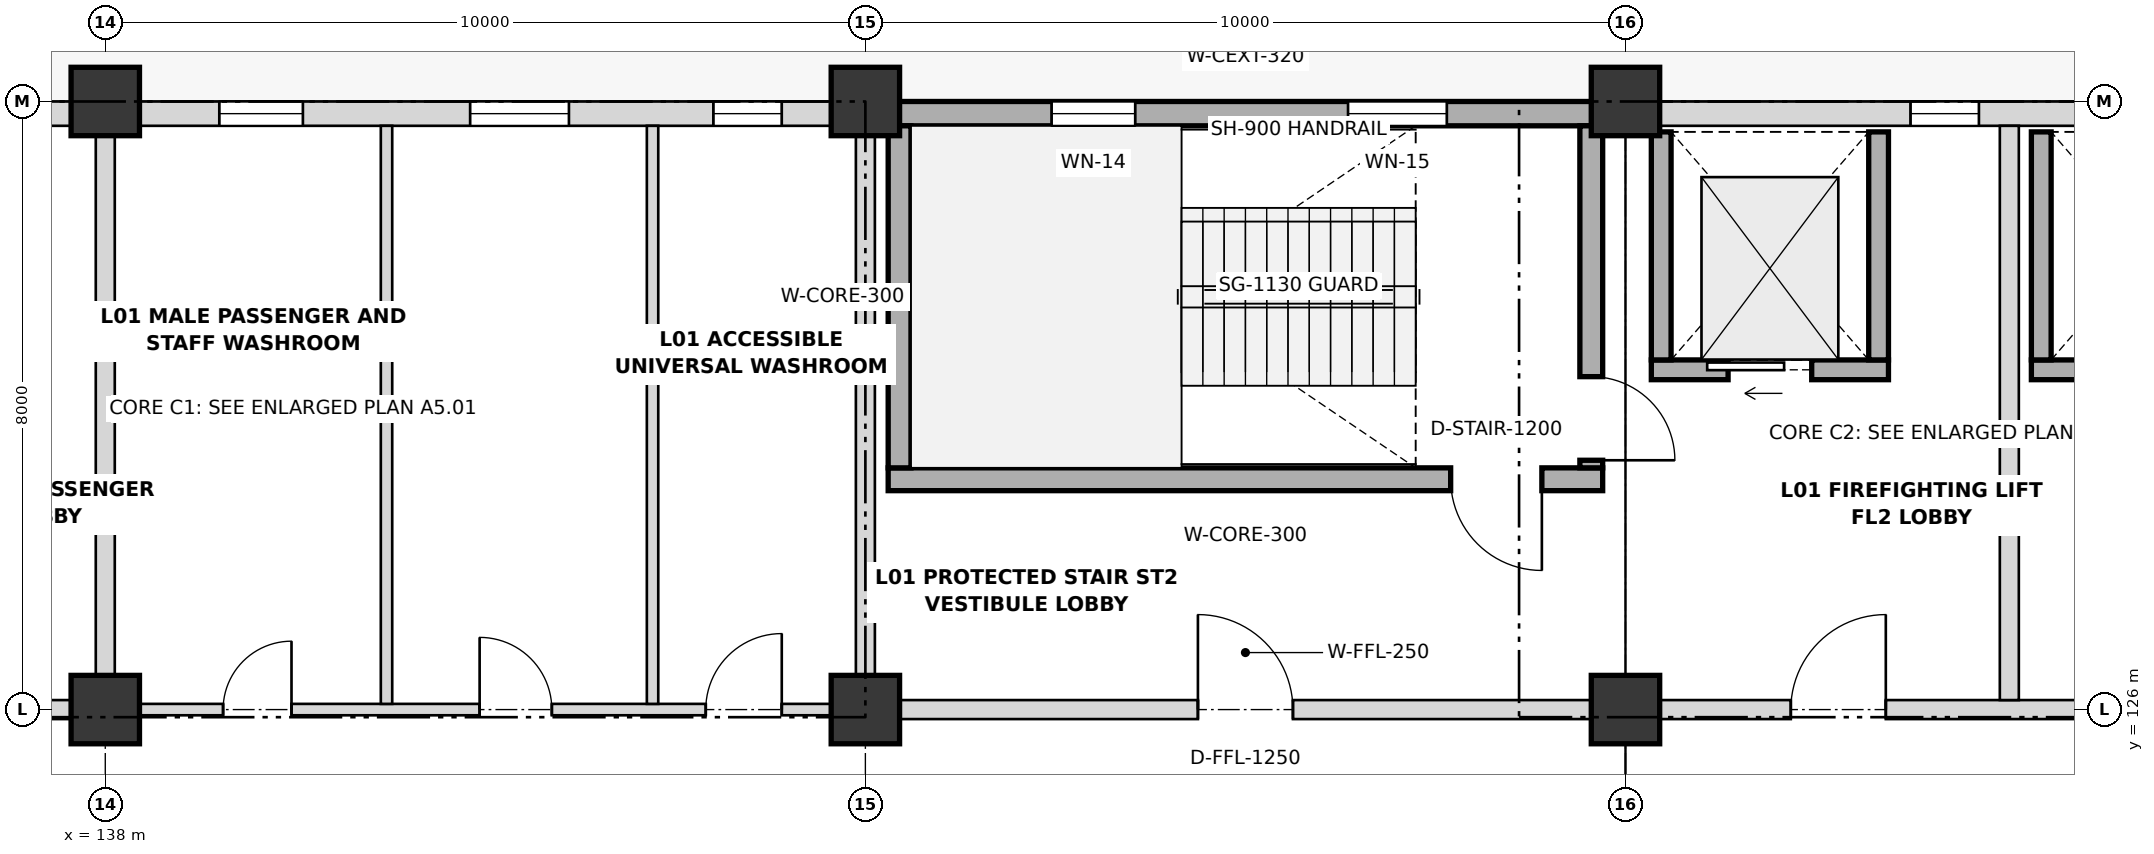
"""IFC4 building model, lengths in metres.
Left out: names, types, materials, properties, quantities, classifications, styles, units other than length and angle.
Written with IfcOpenShell. Run it as: python <this file> out.ifc"""

import sys

from ifc_helpers import new_model, si_unit, direction, frame, frame_2d, origin, origin_2d, place, context, subcontext, project, spatial, rectangle, extrude, element, fill, save


model = new_model("IFC4")
c1 = context("Model", 3, precision=1e-05, world=origin(), true_north=direction((0.0, 1.0)))
c2 = subcontext(c1, "Body", "Model", "MODEL_VIEW")
j1 = project(units=[si_unit("LENGTHUNIT", "METRE"), si_unit("PLANEANGLEUNIT", "RADIAN")], contexts=[c1])
p1 = place(None, origin())
s1 = spatial("IfcSite", under=j1, at=p1, CompositionType="ELEMENT")
p2 = place(p1, origin())
s2 = spatial("IfcBuilding", under=s1, at=p2, CompositionType="ELEMENT")
p3 = place(p2, frame((0.0, 0.0, 5.4)))
s3 = spatial("IfcBuildingStorey", under=s2, at=p3, CompositionType="ELEMENT", Elevation=5.4)
for number, where, z_axis, x_axis in (
    (1, (138.0, 126.0, 0.0), (0.0, 0.0, 1.0), (1.0, 0.0, 0.0)),
    (2, (138.0, 134.0, 0.0), (0.0, 0.0, 1.0), (1.0, 0.0, 0.0)),
    (3, (148.0, 126.0, 0.0), (0.0, 0.0, 1.0), (1.0, 0.0, 0.0)),
    (4, (148.0, 134.0, 0.0), (0.0, 0.0, 1.0), (1.0, 0.0, 0.0)),
    (5, (158.0, 126.0, 0.0), (0.0, 0.0, 1.0), (1.0, 0.0, 0.0)),
    (6, (158.0, 134.0, 0.0), (0.0, 0.0, 1.0), (1.0, 0.0, 0.0)),
):
    element("IfcColumn", number, at=place(p3, frame(where, z_axis=z_axis, x_axis=x_axis)), inside=s3, PredefinedType="COLUMN", context=c2, shape_type="SweptSolid", body=[
        extrude(rectangle(XDim=0.9, YDim=0.9, at=origin_2d()), origin(), (0.0, 0.0, 1.0), 4.2),
    ])
p4 = place(p3, frame((128.445, 133.84, 0.0), z_axis=(0.0, 0.0, 1.0), x_axis=(1.0, 0.0, 0.0)))
e7 = element("IfcWall", 7, at=p4, inside=s3, PredefinedType="SOLIDWALL", context=c2, shape_type="SweptSolid", body=[
    extrude(rectangle(XDim=9.11, YDim=0.32, at=frame_2d((4.555, 0.0))), origin(), (0.0, 0.0, 1.0), 3.118),
])
p5 = place(p4, frame((3.305, 0.0, 1.05)))
e8 = element("IfcOpeningElement", 8, at=p5, cuts=e7, PredefinedType="OPENING", context=c2, shape_type="SweptSolid", body=[
    extrude(rectangle(XDim=0.9, YDim=1.15, at=frame_2d((0.45, 0.575))), frame((0.0, 0.17, 0.0), z_axis=(0.0, -1.0, 0.0), x_axis=(1.0, 0.0, 0.0)), (0.0, 0.0, 1.0), 0.34),
])
p6 = place(p3, frame((138.445, 133.84, 0.0), z_axis=(0.0, 0.0, 1.0), x_axis=(1.0, 0.0, 0.0)))
e9 = element("IfcWall", 9, at=p6, inside=s3, PredefinedType="SOLIDWALL", context=c2, shape_type="SweptSolid", body=[
    extrude(rectangle(XDim=9.11, YDim=0.32, at=frame_2d((4.555, 0.0))), origin(), (0.0, 0.0, 1.0), 3.118),
])
p7 = place(p6, frame((1.055, 0.0, 1.25)))
e10 = element("IfcOpeningElement", 10, at=p7, cuts=e9, PredefinedType="OPENING", context=c2, shape_type="SweptSolid", body=[
    extrude(rectangle(XDim=1.1, YDim=1.15, at=frame_2d((0.55, 0.575))), frame((0.0, 0.17, 0.0), z_axis=(0.0, -1.0, 0.0), x_axis=(1.0, 0.0, 0.0)), (0.0, 0.0, 1.0), 0.34),
])
p8 = place(p6, frame((4.355, 0.0, 1.25)))
e11 = element("IfcOpeningElement", 11, at=p8, cuts=e9, PredefinedType="OPENING", context=c2, shape_type="SweptSolid", body=[
    extrude(rectangle(XDim=1.3, YDim=1.15, at=frame_2d((0.65, 0.575))), frame((0.0, 0.17, 0.0), z_axis=(0.0, -1.0, 0.0), x_axis=(1.0, 0.0, 0.0)), (0.0, 0.0, 1.0), 0.34),
])
p9 = place(p6, frame((7.555, 0.0, 1.25)))
e12 = element("IfcOpeningElement", 12, at=p9, cuts=e9, PredefinedType="OPENING", context=c2, shape_type="SweptSolid", body=[
    extrude(rectangle(XDim=0.9, YDim=1.4, at=frame_2d((0.45, 0.7))), frame((0.0, 0.17, 0.0), z_axis=(0.0, -1.0, 0.0), x_axis=(1.0, 0.0, 0.0)), (0.0, 0.0, 1.0), 0.34),
])
p10 = place(p3, frame((148.445, 133.84, 0.0), z_axis=(0.0, 0.0, 1.0), x_axis=(1.0, 0.0, 0.0)))
e13 = element("IfcWall", 13, at=p10, inside=s3, PredefinedType="SHEAR", context=c2, shape_type="SweptSolid", body=[
    extrude(rectangle(XDim=9.11, YDim=0.32, at=frame_2d((4.555, 0.0))), origin(), (0.0, 0.0, 1.0), 4.2),
])
p11 = place(p10, frame((2.005, 0.0, 1.05)))
e14 = element("IfcOpeningElement", 14, at=p11, cuts=e13, PredefinedType="OPENING", context=c2, shape_type="SweptSolid", body=[
    extrude(rectangle(XDim=1.1, YDim=1.4, at=frame_2d((0.55, 0.7))), frame((0.0, 0.17, 0.0), z_axis=(0.0, -1.0, 0.0), x_axis=(1.0, 0.0, 0.0)), (0.0, 0.0, 1.0), 0.34),
])
p12 = place(p10, frame((5.905, 0.0, 1.05)))
e15 = element("IfcOpeningElement", 15, at=p12, cuts=e13, PredefinedType="OPENING", context=c2, shape_type="SweptSolid", body=[
    extrude(rectangle(XDim=1.3, YDim=1.4, at=frame_2d((0.65, 0.7))), frame((0.0, 0.17, 0.0), z_axis=(0.0, -1.0, 0.0), x_axis=(1.0, 0.0, 0.0)), (0.0, 0.0, 1.0), 0.34),
])
p13 = place(p3, frame((158.445, 133.84, 0.0), z_axis=(0.0, 0.0, 1.0), x_axis=(1.0, 0.0, 0.0)))
e16 = element("IfcWall", 16, at=p13, inside=s3, PredefinedType="SOLIDWALL", context=c2, shape_type="SweptSolid", body=[
    extrude(rectangle(XDim=9.11, YDim=0.32, at=frame_2d((4.555, 0.0))), origin(), (0.0, 0.0, 1.0), 3.118),
])
p14 = place(p13, frame((3.305, 0.0, 1.05)))
e17 = element("IfcOpeningElement", 17, at=p14, cuts=e16, PredefinedType="OPENING", context=c2, shape_type="SweptSolid", body=[
    extrude(rectangle(XDim=0.9, YDim=1.15, at=frame_2d((0.45, 0.575))), frame((0.0, 0.17, 0.0), z_axis=(0.0, -1.0, 0.0), x_axis=(1.0, 0.0, 0.0)), (0.0, 0.0, 1.0), 0.34),
])
p15 = place(p3, frame((157.7, 129.03, 0.0), z_axis=(0.0, 0.0, 1.0), x_axis=(-1.0, 0.0, 0.0)))
e18 = element("IfcWall", 18, at=p15, inside=s3, PredefinedType="SHEAR", context=c2, shape_type="SweptSolid", body=[
    extrude(rectangle(XDim=9.4, YDim=0.3, at=frame_2d((4.7, 0.0))), origin(), (0.0, 0.0, 1.0), 4.2),
])
p16 = place(p15, frame((0.8, 0.0, 0.0)))
e19 = element("IfcOpeningElement", 19, at=p16, cuts=e18, PredefinedType="OPENING", context=c2, shape_type="SweptSolid", body=[
    extrude(rectangle(XDim=1.2, YDim=2.15, at=frame_2d((0.6, 1.075))), frame((0.0, 0.16, 0.0), z_axis=(0.0, -1.0, 0.0), x_axis=(1.0, 0.0, 0.0)), (0.0, 0.0, 1.0), 0.32),
])
p17 = place(p3, frame((157.55, 133.68, 0.0), z_axis=(0.0, 0.0, 1.0), x_axis=(0.0, -1.0, 0.0)))
e20 = element("IfcWall", 20, at=p17, inside=s3, PredefinedType="SHEAR", context=c2, shape_type="SweptSolid", body=[
    extrude(rectangle(XDim=4.5, YDim=0.3, at=frame_2d((2.25, 0.0))), origin(), (0.0, 0.0, 1.0), 4.2),
])
p18 = place(p17, frame((3.3, 0.0, 0.0)))
e21 = element("IfcOpeningElement", 21, at=p18, cuts=e20, PredefinedType="OPENING", context=c2, shape_type="SweptSolid", body=[
    extrude(rectangle(XDim=1.1, YDim=2.15, at=frame_2d((0.55, 1.075))), frame((0.0, 0.16, 0.0), z_axis=(0.0, -1.0, 0.0), x_axis=(1.0, 0.0, 0.0)), (0.0, 0.0, 1.0), 0.32),
])
p19 = place(p3, frame((148.45, 129.18, 0.0), z_axis=(0.0, 0.0, 1.0), x_axis=(0.0, 1.0, 0.0)))
e22 = element("IfcWall", 22, at=p19, inside=s3, PredefinedType="SHEAR", context=c2, shape_type="SweptSolid", body=[
    extrude(rectangle(XDim=4.5, YDim=0.3, at=frame_2d((2.25, 0.0))), origin(), (0.0, 0.0, 1.0), 4.2),
])
p20 = place(p3, frame((158.34, 130.47, 0.0), z_axis=(0.0, 0.0, 1.0), x_axis=(1.0, 0.0, 0.0)))
e23 = element("IfcWall", 23, at=p20, inside=s3, PredefinedType="SHEAR", context=c2, shape_type="SweptSolid", body=[
    extrude(rectangle(XDim=3.12, YDim=0.26, at=frame_2d((1.56, 0.0))), origin(), (0.0, 0.0, 1.0), 4.2),
])
p21 = place(p20, frame((1.01, 0.0, 0.0)))
e24 = element("IfcOpeningElement", 24, at=p21, cuts=e23, PredefinedType="OPENING", context=c2, shape_type="SweptSolid", body=[
    extrude(rectangle(XDim=1.1, YDim=2.1, at=frame_2d((0.55, 1.05))), frame((0.0, 0.14, 0.0), z_axis=(0.0, -1.0, 0.0), x_axis=(1.0, 0.0, 0.0)), (0.0, 0.0, 1.0), 0.28),
])
for number, where, z_axis, x_axis in (
    (25, (158.47, 130.6, 0.0), (0.0, 0.0, 1.0), (0.0, 1.0, 0.0)),
    (26, (161.33, 130.6, 0.0), (0.0, 0.0, 1.0), (0.0, 1.0, 0.0)),
):
    element("IfcWall", number, at=place(p3, frame(where, z_axis=z_axis, x_axis=x_axis)), inside=s3, PredefinedType="SHEAR", context=c2, shape_type="SweptSolid", body=[
        extrude(rectangle(XDim=3.0, YDim=0.26, at=frame_2d((1.5, 0.0))), origin(), (0.0, 0.0, 1.0), 4.2),
    ])
p22 = place(p3, frame((163.34, 130.47, 0.0), z_axis=(0.0, 0.0, 1.0), x_axis=(1.0, 0.0, 0.0)))
e27 = element("IfcWall", 27, at=p22, inside=s3, PredefinedType="SHEAR", context=c2, shape_type="SweptSolid", body=[
    extrude(rectangle(XDim=3.12, YDim=0.26, at=frame_2d((1.56, 0.0))), origin(), (0.0, 0.0, 1.0), 4.2),
])
p23 = place(p22, frame((1.01, 0.0, 0.0)))
e28 = element("IfcOpeningElement", 28, at=p23, cuts=e27, PredefinedType="OPENING", context=c2, shape_type="SweptSolid", body=[
    extrude(rectangle(XDim=1.1, YDim=2.15, at=frame_2d((0.55, 1.075))), frame((0.0, 0.14, 0.0), z_axis=(0.0, -1.0, 0.0), x_axis=(1.0, 0.0, 0.0)), (0.0, 0.0, 1.0), 0.28),
])
p24 = place(p3, frame((163.47, 130.6, 0.0), z_axis=(0.0, 0.0, 1.0), x_axis=(0.0, 1.0, 0.0)))
e29 = element("IfcWall", 29, at=p24, inside=s3, PredefinedType="SHEAR", context=c2, shape_type="SweptSolid", body=[
    extrude(rectangle(XDim=3.0, YDim=0.26, at=frame_2d((1.5, 0.0))), origin(), (0.0, 0.0, 1.0), 4.2),
])
p25 = place(p3, frame((128.455, 126.0, 0.0), z_axis=(0.0, 0.0, 1.0), x_axis=(1.0, 0.0, 0.0)))
e30 = element("IfcWall", 30, at=p25, inside=s3, PredefinedType="PARTITIONING", context=c2, shape_type="SweptSolid", body=[
    extrude(rectangle(XDim=9.09, YDim=0.25, at=frame_2d((4.545, 0.0))), origin(), (0.0, 0.0, 1.0), 3.018),
])
p26 = place(p25, frame((1.72, 0.0, 0.0)))
e31 = element("IfcOpeningElement", 31, at=p26, cuts=e30, PredefinedType="OPENING", context=c2, shape_type="SweptSolid", body=[
    extrude(rectangle(XDim=1.25, YDim=2.15, at=frame_2d((0.625, 1.075))), frame((0.0, 0.135, 0.0), z_axis=(0.0, -1.0, 0.0), x_axis=(1.0, 0.0, 0.0)), (0.0, 0.0, 1.0), 0.27),
])
p27 = place(p25, frame((6.195, 0.0, 0.0)))
e32 = element("IfcOpeningElement", 32, at=p27, cuts=e30, PredefinedType="OPENING", context=c2, shape_type="SweptSolid", body=[
    extrude(rectangle(XDim=1.1, YDim=2.15, at=frame_2d((0.55, 1.075))), frame((0.0, 0.135, 0.0), z_axis=(0.0, -1.0, 0.0), x_axis=(1.0, 0.0, 0.0)), (0.0, 0.0, 1.0), 0.27),
])
p28 = place(p3, frame((138.455, 126.0, 0.0), z_axis=(0.0, 0.0, 1.0), x_axis=(1.0, 0.0, 0.0)))
e33 = element("IfcWall", 33, at=p28, inside=s3, PredefinedType="PARTITIONING", context=c2, shape_type="SweptSolid", body=[
    extrude(rectangle(XDim=9.09, YDim=0.15, at=frame_2d((4.545, 0.0))), origin(), (0.0, 0.0, 1.0), 3.018),
])
p29 = place(p28, frame((1.095, 0.0, 0.0)))
e34 = element("IfcOpeningElement", 34, at=p29, cuts=e33, PredefinedType="OPENING", context=c2, shape_type="SweptSolid", body=[
    extrude(rectangle(XDim=0.9, YDim=2.05, at=frame_2d((0.45, 1.025))), frame((0.0, 0.085, 0.0), z_axis=(0.0, -1.0, 0.0), x_axis=(1.0, 0.0, 0.0)), (0.0, 0.0, 1.0), 0.17),
])
p30 = place(p28, frame((4.47, 0.0, 0.0)))
e35 = element("IfcOpeningElement", 35, at=p30, cuts=e33, PredefinedType="OPENING", context=c2, shape_type="SweptSolid", body=[
    extrude(rectangle(XDim=0.95, YDim=2.05, at=frame_2d((0.475, 1.025))), frame((0.0, 0.085, 0.0), z_axis=(0.0, -1.0, 0.0), x_axis=(1.0, 0.0, 0.0)), (0.0, 0.0, 1.0), 0.17),
])
p31 = place(p28, frame((7.445, 0.0, 0.0)))
e36 = element("IfcOpeningElement", 36, at=p31, cuts=e33, PredefinedType="OPENING", context=c2, shape_type="SweptSolid", body=[
    extrude(rectangle(XDim=1.0, YDim=2.05, at=frame_2d((0.5, 1.025))), frame((0.0, 0.085, 0.0), z_axis=(0.0, -1.0, 0.0), x_axis=(1.0, 0.0, 0.0)), (0.0, 0.0, 1.0), 0.17),
])
p32 = place(p3, frame((148.455, 126.0, 0.0), z_axis=(0.0, 0.0, 1.0), x_axis=(1.0, 0.0, 0.0)))
e37 = element("IfcWall", 37, at=p32, inside=s3, PredefinedType="PARTITIONING", context=c2, shape_type="SweptSolid", body=[
    extrude(rectangle(XDim=9.09, YDim=0.25, at=frame_2d((4.545, 0.0))), origin(), (0.0, 0.0, 1.0), 3.018),
])
p33 = place(p32, frame((3.92, 0.0, 0.0)))
e38 = element("IfcOpeningElement", 38, at=p33, cuts=e37, PredefinedType="OPENING", context=c2, shape_type="SweptSolid", body=[
    extrude(rectangle(XDim=1.25, YDim=2.15, at=frame_2d((0.625, 1.075))), frame((0.0, 0.135, 0.0), z_axis=(0.0, -1.0, 0.0), x_axis=(1.0, 0.0, 0.0)), (0.0, 0.0, 1.0), 0.27),
])
p34 = place(p3, frame((158.455, 126.0, 0.0), z_axis=(0.0, 0.0, 1.0), x_axis=(1.0, 0.0, 0.0)))
e39 = element("IfcWall", 39, at=p34, inside=s3, PredefinedType="PARTITIONING", context=c2, shape_type="SweptSolid", body=[
    extrude(rectangle(XDim=9.09, YDim=0.25, at=frame_2d((4.545, 0.0))), origin(), (0.0, 0.0, 1.0), 3.018),
])
p35 = place(p34, frame((1.72, 0.0, 0.0)))
e40 = element("IfcOpeningElement", 40, at=p35, cuts=e39, PredefinedType="OPENING", context=c2, shape_type="SweptSolid", body=[
    extrude(rectangle(XDim=1.25, YDim=2.15, at=frame_2d((0.625, 1.075))), frame((0.0, 0.135, 0.0), z_axis=(0.0, -1.0, 0.0), x_axis=(1.0, 0.0, 0.0)), (0.0, 0.0, 1.0), 0.27),
])
p36 = place(p34, frame((6.195, 0.0, 0.0)))
e41 = element("IfcOpeningElement", 41, at=p36, cuts=e39, PredefinedType="OPENING", context=c2, shape_type="SweptSolid", body=[
    extrude(rectangle(XDim=1.1, YDim=2.15, at=frame_2d((0.55, 1.075))), frame((0.0, 0.135, 0.0), z_axis=(0.0, -1.0, 0.0), x_axis=(1.0, 0.0, 0.0)), (0.0, 0.0, 1.0), 0.27),
])
p37 = place(p3, frame((163.05, 126.125, 0.0), z_axis=(0.0, 0.0, 1.0), x_axis=(0.0, 1.0, 0.0)))
e42 = element("IfcWall", 42, at=p37, inside=s3, PredefinedType="PARTITIONING", context=c2, shape_type="SweptSolid", body=[
    extrude(rectangle(XDim=7.555, YDim=0.25, at=frame_2d((3.777, 0.0))), origin(), (0.0, 0.0, 1.0), 3.018),
])
for number, where, z_axis, x_axis in (
    (43, (141.7, 126.075, 0.0), (0.0, 0.0, 1.0), (0.0, 1.0, 0.0)),
    (44, (145.2, 126.075, 0.0), (0.0, 0.0, 1.0), (0.0, 1.0, 0.0)),
):
    element("IfcWall", number, at=place(p3, frame(where, z_axis=z_axis, x_axis=x_axis)), inside=s3, PredefinedType="PARTITIONING", context=c2, shape_type="SweptSolid", body=[
        extrude(rectangle(XDim=7.605, YDim=0.15, at=frame_2d((3.802, 0.0))), origin(), (0.0, 0.0, 1.0), 3.018),
    ])
for number, where, z_axis, x_axis in (
    (45, (138.0, 126.455, 0.0), (0.0, 0.0, 1.0), (0.0, 1.0, 0.0)),
    (46, (148.0, 126.455, 0.0), (0.0, 0.0, 1.0), (0.0, 1.0, 0.0)),
):
    element("IfcWall", number, at=place(p3, frame(where, z_axis=z_axis, x_axis=x_axis)), inside=s3, PredefinedType="PARTITIONING", context=c2, shape_type="SweptSolid", body=[
        extrude(rectangle(XDim=7.09, YDim=0.25, at=frame_2d((3.545, 0.0))), origin(), (0.0, 0.0, 1.0), 3.118),
    ])
p38 = place(p7, origin())
e47 = element("IfcWindow", 47, at=p38, inside=s3, PartitioningType="SINGLE_PANEL", PredefinedType="WINDOW", context=c2, shape_type="SweptSolid", body=[
    extrude(rectangle(XDim=1.1, YDim=1.15, at=frame_2d((0.55, 0.575))), frame((0.0, 0.03, 0.0), z_axis=(0.0, -1.0, 0.0), x_axis=(1.0, 0.0, 0.0)), (0.0, 0.0, 1.0), 0.06),
])
fill(e10, e47)
p39 = place(p8, origin())
e48 = element("IfcWindow", 48, at=p39, inside=s3, PartitioningType="SINGLE_PANEL", PredefinedType="WINDOW", context=c2, shape_type="SweptSolid", body=[
    extrude(rectangle(XDim=1.3, YDim=1.15, at=frame_2d((0.65, 0.575))), frame((0.0, 0.03, 0.0), z_axis=(0.0, -1.0, 0.0), x_axis=(1.0, 0.0, 0.0)), (0.0, 0.0, 1.0), 0.06),
])
fill(e11, e48)
p40 = place(p9, origin())
e49 = element("IfcWindow", 49, at=p40, inside=s3, PartitioningType="SINGLE_PANEL", PredefinedType="WINDOW", context=c2, shape_type="SweptSolid", body=[
    extrude(rectangle(XDim=0.9, YDim=1.4, at=frame_2d((0.45, 0.7))), frame((0.0, 0.03, 0.0), z_axis=(0.0, -1.0, 0.0), x_axis=(1.0, 0.0, 0.0)), (0.0, 0.0, 1.0), 0.06),
])
fill(e12, e49)
p41 = place(p11, origin())
e50 = element("IfcWindow", 50, at=p41, inside=s3, PartitioningType="SINGLE_PANEL", PredefinedType="WINDOW", context=c2, shape_type="SweptSolid", body=[
    extrude(rectangle(XDim=1.1, YDim=1.4, at=frame_2d((0.55, 0.7))), frame((0.0, 0.03, 0.0), z_axis=(0.0, -1.0, 0.0), x_axis=(1.0, 0.0, 0.0)), (0.0, 0.0, 1.0), 0.06),
])
fill(e14, e50)
p42 = place(p12, origin())
e51 = element("IfcWindow", 51, at=p42, inside=s3, PartitioningType="SINGLE_PANEL", PredefinedType="WINDOW", context=c2, shape_type="SweptSolid", body=[
    extrude(rectangle(XDim=1.3, YDim=1.4, at=frame_2d((0.65, 0.7))), frame((0.0, 0.03, 0.0), z_axis=(0.0, -1.0, 0.0), x_axis=(1.0, 0.0, 0.0)), (0.0, 0.0, 1.0), 0.06),
])
fill(e15, e51)
p43 = place(p14, origin())
e52 = element("IfcWindow", 52, at=p43, inside=s3, PartitioningType="SINGLE_PANEL", PredefinedType="WINDOW", context=c2, shape_type="SweptSolid", body=[
    extrude(rectangle(XDim=0.9, YDim=1.15, at=frame_2d((0.45, 0.575))), frame((0.0, 0.03, 0.0), z_axis=(0.0, -1.0, 0.0), x_axis=(1.0, 0.0, 0.0)), (0.0, 0.0, 1.0), 0.06),
])
fill(e17, e52)
p44 = place(p16, origin())
e53 = element("IfcDoor", 53, at=p44, inside=s3, OperationType="SINGLE_SWING_LEFT", PredefinedType="DOOR", context=c2, shape_type="SweptSolid", body=[
    extrude(rectangle(XDim=1.2, YDim=2.15, at=frame_2d((0.6, 1.075))), frame((0.0, 0.025, 0.0), z_axis=(0.0, -1.0, 0.0), x_axis=(1.0, 0.0, 0.0)), (0.0, 0.0, 1.0), 0.05),
])
fill(e19, e53)
p45 = place(p18, origin())
e54 = element("IfcDoor", 54, at=p45, inside=s3, OperationType="SINGLE_SWING_RIGHT", PredefinedType="DOOR", context=c2, shape_type="SweptSolid", body=[
    extrude(rectangle(XDim=1.1, YDim=2.15, at=frame_2d((0.55, 1.075))), frame((0.0, 0.025, 0.0), z_axis=(0.0, -1.0, 0.0), x_axis=(1.0, 0.0, 0.0)), (0.0, 0.0, 1.0), 0.05),
])
fill(e21, e54)
p46 = place(p21, origin())
e55 = element("IfcDoor", 55, at=p46, inside=s3, OperationType="SLIDING_TO_LEFT", PredefinedType="DOOR", context=c2, shape_type="SweptSolid", body=[
    extrude(rectangle(XDim=1.1, YDim=2.1, at=frame_2d((0.55, 1.05))), frame((0.0, 0.025, 0.0), z_axis=(0.0, -1.0, 0.0), x_axis=(1.0, 0.0, 0.0)), (0.0, 0.0, 1.0), 0.05),
])
fill(e24, e55)
p47 = place(p29, origin())
e56 = element("IfcDoor", 56, at=p47, inside=s3, OperationType="SINGLE_SWING_RIGHT", PredefinedType="DOOR", context=c2, shape_type="SweptSolid", body=[
    extrude(rectangle(XDim=0.9, YDim=2.05, at=frame_2d((0.45, 1.025))), frame((0.0, 0.025, 0.0), z_axis=(0.0, -1.0, 0.0), x_axis=(1.0, 0.0, 0.0)), (0.0, 0.0, 1.0), 0.05),
])
fill(e34, e56)
p48 = place(p30, origin())
e57 = element("IfcDoor", 57, at=p48, inside=s3, OperationType="SINGLE_SWING_LEFT", PredefinedType="DOOR", context=c2, shape_type="SweptSolid", body=[
    extrude(rectangle(XDim=0.95, YDim=2.05, at=frame_2d((0.475, 1.025))), frame((0.0, 0.025, 0.0), z_axis=(0.0, -1.0, 0.0), x_axis=(1.0, 0.0, 0.0)), (0.0, 0.0, 1.0), 0.05),
])
fill(e35, e57)
p49 = place(p31, origin())
e58 = element("IfcDoor", 58, at=p49, inside=s3, OperationType="SINGLE_SWING_RIGHT", PredefinedType="DOOR", context=c2, shape_type="SweptSolid", body=[
    extrude(rectangle(XDim=1.0, YDim=2.05, at=frame_2d((0.5, 1.025))), frame((0.0, 0.025, 0.0), z_axis=(0.0, -1.0, 0.0), x_axis=(1.0, 0.0, 0.0)), (0.0, 0.0, 1.0), 0.05),
])
fill(e36, e58)
p50 = place(p33, origin())
e59 = element("IfcDoor", 59, at=p50, inside=s3, OperationType="SINGLE_SWING_LEFT", PredefinedType="DOOR", context=c2, shape_type="SweptSolid", body=[
    extrude(rectangle(XDim=1.25, YDim=2.15, at=frame_2d((0.625, 1.075))), frame((0.0, 0.025, 0.0), z_axis=(0.0, -1.0, 0.0), x_axis=(1.0, 0.0, 0.0)), (0.0, 0.0, 1.0), 0.05),
])
fill(e38, e59)
p51 = place(p35, origin())
e60 = element("IfcDoor", 60, at=p51, inside=s3, OperationType="SINGLE_SWING_RIGHT", PredefinedType="DOOR", context=c2, shape_type="SweptSolid", body=[
    extrude(rectangle(XDim=1.25, YDim=2.15, at=frame_2d((0.625, 1.075))), frame((0.0, 0.025, 0.0), z_axis=(0.0, -1.0, 0.0), x_axis=(1.0, 0.0, 0.0)), (0.0, 0.0, 1.0), 0.05),
])
fill(e40, e60)
save(model, sys.argv[1])
